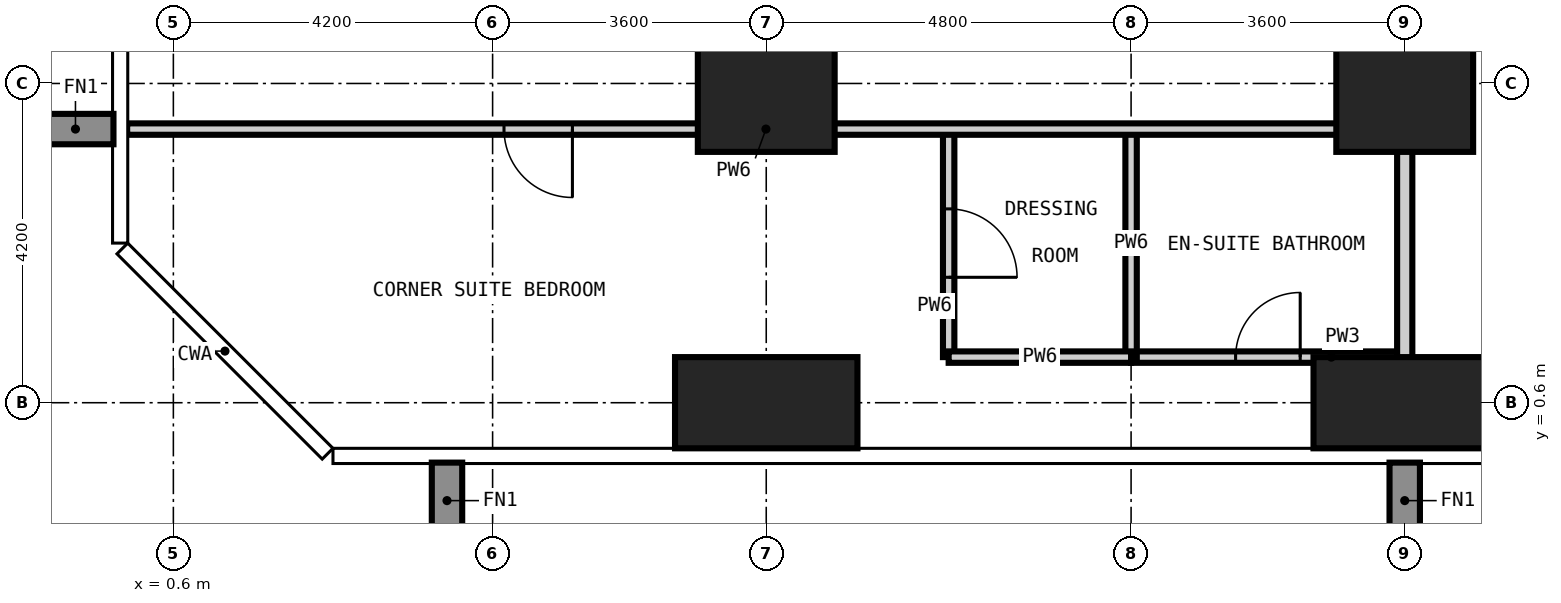
"""IFC4 building model, lengths in metres.
Left out: names, types, materials, properties, quantities, classifications, styles, units other than length and angle.
Written with IfcOpenShell. Run it as: python <this file> out.ifc"""

import sys

from ifc_helpers import new_model, si_unit, direction, frame, frame_2d, origin, origin_2d, place, context, subcontext, project, spatial, rectangle, extrude, element, fill, save


model = new_model("IFC4")
c1 = context("Model", 3, precision=1e-05, world=origin(), true_north=direction((0.0, 1.0)))
c2 = subcontext(c1, "Body", "Model", "MODEL_VIEW")
j1 = project(units=[si_unit("LENGTHUNIT", "METRE"), si_unit("PLANEANGLEUNIT", "RADIAN")], contexts=[c1])
p1 = place(None, origin())
s1 = spatial("IfcSite", under=j1, at=p1, CompositionType="ELEMENT")
p2 = place(p1, origin())
s2 = spatial("IfcBuilding", under=s1, at=p2, CompositionType="ELEMENT")
p3 = place(p2, frame((0.0, 0.0, 52.2)))
s3 = spatial("IfcBuildingStorey", under=s2, at=p3, CompositionType="ELEMENT", Elevation=52.2)
p4 = place(p3, frame((8.4, 0.6, -0.35), z_axis=(0.0, 0.0, 1.0), x_axis=(1.0, 0.0, 0.0)))
e1 = element("IfcColumn", 1, at=p4, inside=s3, PredefinedType="COLUMN", context=c2, shape_type="SweptSolid", body=[
    extrude(rectangle(XDim=2.4, YDim=1.2, at=origin_2d()), origin(), (0.0, 0.0, 1.0), 3.6),
])
p5 = place(p3, frame((8.4, 4.8, -0.35), z_axis=(0.0, 0.0, 1.0), x_axis=(1.0, 0.0, 0.0)))
e2 = element("IfcColumn", 2, at=p5, inside=s3, PredefinedType="COLUMN", context=c2, shape_type="SweptSolid", body=[
    extrude(rectangle(XDim=1.8, YDim=1.8, at=origin_2d()), origin(), (0.0, 0.0, 1.0), 3.6),
])
p6 = place(p3, frame((16.8, 0.6, -0.35), z_axis=(0.0, 0.0, 1.0), x_axis=(1.0, 0.0, 0.0)))
e3 = element("IfcColumn", 3, at=p6, inside=s3, PredefinedType="COLUMN", context=c2, shape_type="SweptSolid", body=[
    extrude(rectangle(XDim=2.4, YDim=1.2, at=origin_2d()), origin(), (0.0, 0.0, 1.0), 3.6),
])
p7 = place(p3, frame((16.8, 4.8, -0.35), z_axis=(0.0, 0.0, 1.0), x_axis=(1.0, 0.0, 0.0)))
e4 = element("IfcColumn", 4, at=p7, inside=s3, PredefinedType="COLUMN", context=c2, shape_type="SweptSolid", body=[
    extrude(rectangle(XDim=1.8, YDim=1.8, at=origin_2d()), origin(), (0.0, 0.0, 1.0), 3.6),
])
p8 = place(p3, frame((13.2, 1.2, 0.0), z_axis=(0.0, 0.0, 1.0), x_axis=(1.0, 0.0, 0.0)))
e5 = element("IfcWall", 5, at=p8, inside=s3, PredefinedType="PARTITIONING", context=c2, shape_type="SweptSolid", body=[
    extrude(rectangle(XDim=3.6, YDim=0.15, at=frame_2d((1.8, 0.0))), origin(), (0.0, 0.0, 1.0), 3.25),
])
p9 = place(p8, frame((1.375, 0.0, 0.0)))
e6 = element("IfcOpeningElement", 6, at=p9, cuts=e5, PredefinedType="OPENING", context=c2, shape_type="SweptSolid", body=[
    extrude(rectangle(XDim=0.85, YDim=2.1, at=frame_2d((0.425, 1.05))), frame((0.0, 0.085, 0.0), z_axis=(0.0, -1.0, 0.0), x_axis=(1.0, 0.0, 0.0)), (0.0, 0.0, 1.0), 0.17),
])
p10 = place(p3, frame((16.8, -0.008, 0.0), z_axis=(0.0, 0.0, 1.0), x_axis=(0.0, 1.0, 0.0)))
e7 = element("IfcWall", 7, at=p10, inside=s3, PredefinedType="PARTITIONING", context=c2, shape_type="SweptSolid", body=[
    extrude(rectangle(XDim=12.658, YDim=0.2, at=frame_2d((6.329, 0.0))), origin(), (0.0, 0.0, 1.0), 3.25),
])
p11 = place(p3, frame((10.8, 1.2, 0.0), z_axis=(0.0, 0.0, 1.0), x_axis=(0.0, 1.0, 0.0)))
e8 = element("IfcWall", 8, at=p11, inside=s3, PredefinedType="PARTITIONING", context=c2, shape_type="SweptSolid", body=[
    extrude(rectangle(XDim=3.0, YDim=0.15, at=frame_2d((1.5, 0.0))), origin(), (0.0, 0.0, 1.0), 3.25),
])
p12 = place(p11, frame((1.05, 0.0, 0.0)))
e9 = element("IfcOpeningElement", 9, at=p12, cuts=e8, PredefinedType="OPENING", context=c2, shape_type="SweptSolid", body=[
    extrude(rectangle(XDim=0.9, YDim=2.1, at=frame_2d((0.45, 1.05))), frame((0.0, 0.085, 0.0), z_axis=(0.0, -1.0, 0.0), x_axis=(1.0, 0.0, 0.0)), (0.0, 0.0, 1.0), 0.17),
])
p13 = place(p3, frame((13.2, 1.2, 0.0), z_axis=(0.0, 0.0, 1.0), x_axis=(0.0, 1.0, 0.0)))
e10 = element("IfcWall", 10, at=p13, inside=s3, PredefinedType="PARTITIONING", context=c2, shape_type="SweptSolid", body=[
    extrude(rectangle(XDim=3.0, YDim=0.15, at=frame_2d((1.5, 0.0))), origin(), (0.0, 0.0, 1.0), 3.25),
])
p14 = place(p3, frame((10.8, 1.2, 0.0), z_axis=(0.0, 0.0, 1.0), x_axis=(1.0, 0.0, 0.0)))
e11 = element("IfcWall", 11, at=p14, inside=s3, PredefinedType="PARTITIONING", context=c2, shape_type="SweptSolid", body=[
    extrude(rectangle(XDim=2.4, YDim=0.15, at=frame_2d((1.2, 0.0))), origin(), (0.0, 0.0, 1.0), 3.25),
])
p15 = place(p3, frame((-0.008, 4.2, 0.0), z_axis=(0.0, 0.0, 1.0), x_axis=(1.0, 0.0, 0.0)))
e12 = element("IfcWall", 12, at=p15, inside=s3, PredefinedType="PARTITIONING", context=c2, shape_type="SweptSolid", body=[
    extrude(rectangle(XDim=16.808, YDim=0.15, at=frame_2d((8.404, 0.0))), origin(), (0.0, 0.0, 1.0), 3.25),
])
p16 = place(p15, frame((4.958, 0.0, 0.0)))
e13 = element("IfcOpeningElement", 13, at=p16, cuts=e12, PredefinedType="OPENING", context=c2, shape_type="SweptSolid", body=[
    extrude(rectangle(XDim=0.9, YDim=2.1, at=frame_2d((0.45, 1.05))), frame((0.0, 0.085, 0.0), z_axis=(0.0, -1.0, 0.0), x_axis=(1.0, 0.0, 0.0)), (0.0, 0.0, 1.0), 0.17),
])
p17 = place(p16, frame((0.9, 0.0, 0.0), z_axis=(0.0, 0.0, 1.0), x_axis=(-1.0, 0.0, 0.0)))
e14 = element("IfcDoor", 14, at=p17, inside=s3, OperationType="SINGLE_SWING_LEFT", PredefinedType="DOOR", context=c2, shape_type="SweptSolid", body=[
    extrude(rectangle(XDim=0.9, YDim=2.1, at=frame_2d((0.45, 1.05))), frame((0.0, 0.025, 0.0), z_axis=(0.0, -1.0, 0.0), x_axis=(1.0, 0.0, 0.0)), (0.0, 0.0, 1.0), 0.05),
])
fill(e13, e14)
p18 = place(p9, origin())
e15 = element("IfcDoor", 15, at=p18, inside=s3, OperationType="SINGLE_SWING_RIGHT", PredefinedType="DOOR", context=c2, shape_type="SweptSolid", body=[
    extrude(rectangle(XDim=0.85, YDim=2.1, at=frame_2d((0.425, 1.05))), frame((0.0, 0.025, 0.0), z_axis=(0.0, -1.0, 0.0), x_axis=(1.0, 0.0, 0.0)), (0.0, 0.0, 1.0), 0.05),
])
fill(e6, e15)
p19 = place(p12, frame((0.9, 0.0, 0.0), z_axis=(0.0, 0.0, 1.0), x_axis=(-1.0, 0.0, 0.0)))
e16 = element("IfcDoor", 16, at=p19, inside=s3, OperationType="SINGLE_SWING_RIGHT", PredefinedType="DOOR", context=c2, shape_type="SweptSolid", body=[
    extrude(rectangle(XDim=0.9, YDim=2.1, at=frame_2d((0.45, 1.05))), frame((0.0, 0.025, 0.0), z_axis=(0.0, -1.0, 0.0), x_axis=(1.0, 0.0, 0.0)), (0.0, 0.0, 1.0), 0.05),
])
fill(e9, e16)
save(model, sys.argv[1])
